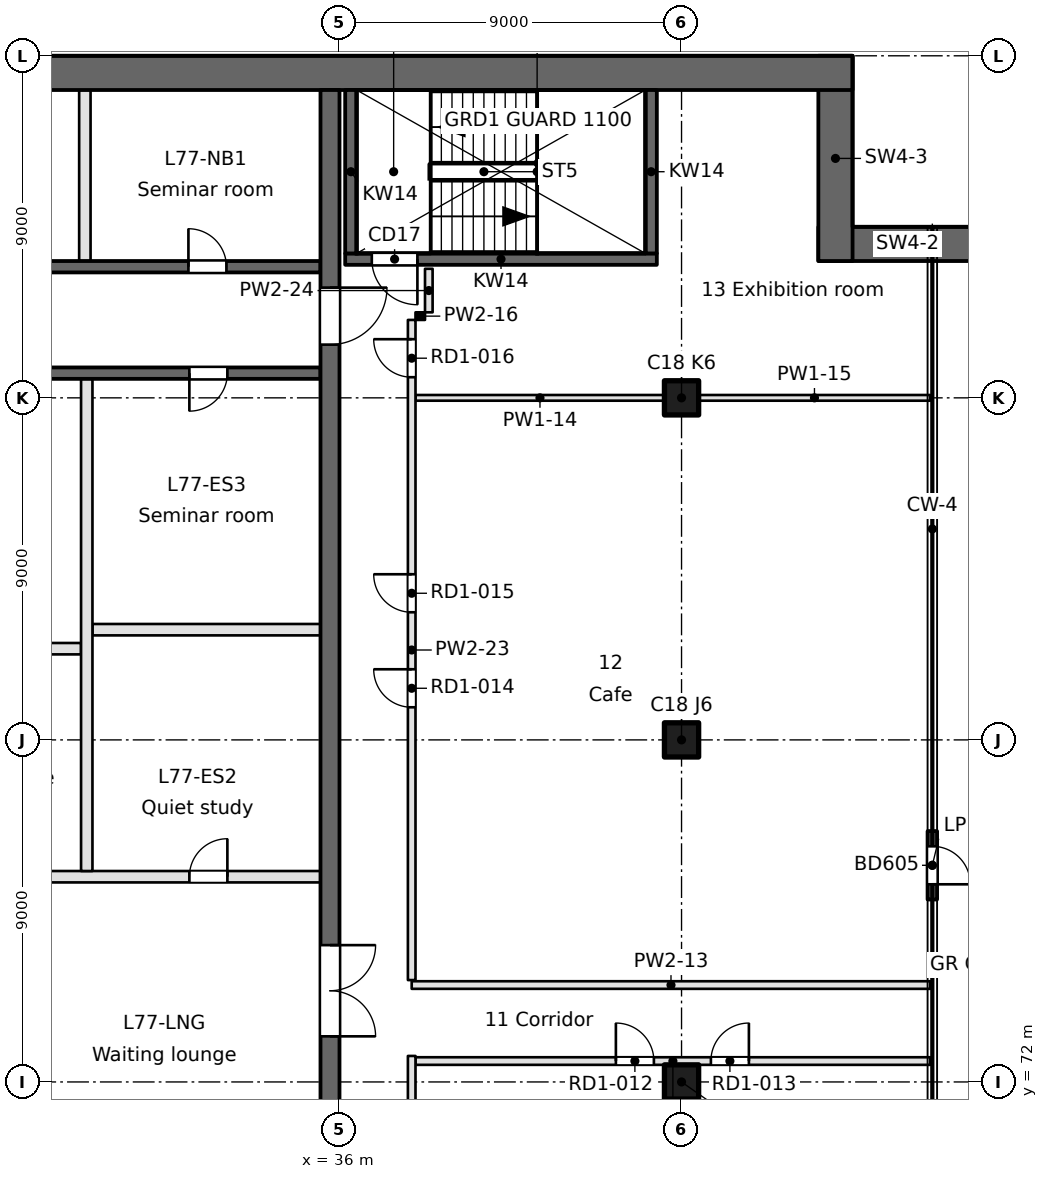
"""IFC4 building model, lengths in metres.
Left out: names, types, materials, properties, quantities, classifications, styles, units other than length and angle.
Written with IfcOpenShell. Run it as: python <this file> out.ifc"""

import sys

from ifc_helpers import new_model, si_unit, direction, frame, frame_2d, origin, origin_2d, place, context, subcontext, project, spatial, rectangle, extrude, element, fill, save


model = new_model("IFC4")
c1 = context("Model", 3, precision=1e-05, world=origin(), true_north=direction((0.0, 1.0)))
c2 = subcontext(c1, "Body", "Model", "MODEL_VIEW")
j1 = project(units=[si_unit("LENGTHUNIT", "METRE"), si_unit("PLANEANGLEUNIT", "RADIAN")], contexts=[c1])
p1 = place(None, origin())
s1 = spatial("IfcSite", under=j1, at=p1, CompositionType="ELEMENT")
p2 = place(p1, origin())
s2 = spatial("IfcBuilding", under=s1, at=p2, CompositionType="ELEMENT")
p3 = place(p2, frame((0.0, 0.0, 299.3)))
s3 = spatial("IfcBuildingStorey", under=s2, at=p3, CompositionType="ELEMENT", Elevation=299.3)
for number, where, z_axis, x_axis in (
    (1, (45.0, 72.0, 0.0), (0.0, 0.0, 1.0), (1.0, 0.0, 0.0)),
    (2, (45.0, 81.0, 0.0), (0.0, 0.0, 1.0), (1.0, 0.0, 0.0)),
    (3, (45.0, 90.0, 0.0), (0.0, 0.0, 1.0), (1.0, 0.0, 0.0)),
):
    element("IfcColumn", number, at=place(p3, frame(where, z_axis=z_axis, x_axis=x_axis)), inside=s3, PredefinedType="COLUMN", context=c2, shape_type="SweptSolid", body=[
        extrude(rectangle(XDim=0.9, YDim=0.9, at=origin_2d()), origin(), (0.0, 0.0, 1.0), 3.7),
    ])
p4 = place(p3, frame((53.3, 94.05, 0.0), z_axis=(0.0, 0.0, 1.0), x_axis=(-1.0, 0.0, 0.0)))
e4 = element("IfcWall", 4, at=p4, inside=s3, PredefinedType="SHEAR", context=c2, shape_type="SweptSolid", body=[
    extrude(rectangle(XDim=4.7, YDim=0.9, at=frame_2d((2.35, 0.0))), origin(), (0.0, 0.0, 1.0), 3.7),
])
p5 = place(p3, frame((49.05, 93.6, 0.0), z_axis=(0.0, 0.0, 1.0), x_axis=(0.0, 1.0, 0.0)))
e5 = element("IfcWall", 5, at=p5, inside=s3, PredefinedType="SHEAR", context=c2, shape_type="SweptSolid", body=[
    extrude(rectangle(XDim=5.4, YDim=0.9, at=frame_2d((2.7, 0.0))), origin(), (0.0, 0.0, 1.0), 3.7),
])
p6 = place(p3, frame((49.5, 98.55, 0.0), z_axis=(0.0, 0.0, 1.0), x_axis=(-1.0, 0.0, 0.0)))
e6 = element("IfcWall", 6, at=p6, inside=s3, PredefinedType="SHEAR", context=c2, shape_type="SweptSolid", body=[
    extrude(rectangle(XDim=45.0, YDim=0.9, at=frame_2d((22.5, 0.0))), origin(), (0.0, 0.0, 1.0), 3.7),
])
p7 = place(p3, frame((51.599, 76.801, 0.0), z_axis=(0.0, 0.0, 1.0), x_axis=(0.0, 1.0, 0.0)))
e7 = element("IfcWall", 7, at=p7, inside=s3, PredefinedType="SOLIDWALL", context=c2, shape_type="SweptSolid", body=[
    extrude(rectangle(XDim=1.8, YDim=0.25, at=frame_2d((0.9, 0.0))), origin(), (0.0, 0.0, 1.0), 3.25),
])
p8 = place(p7, frame((0.4, 0.0, 0.0)))
e8 = element("IfcOpeningElement", 8, at=p8, cuts=e7, PredefinedType="OPENING", context=c2, shape_type="SweptSolid", body=[
    extrude(rectangle(XDim=1.0, YDim=2.1, at=frame_2d((0.5, 1.05))), frame((0.0, 0.125, 0.0), z_axis=(0.0, -1.0, 0.0), x_axis=(1.0, 0.0, 0.0)), (0.0, 0.0, 1.0), 0.25),
])
p9 = place(p3, frame((22.35, 77.4, 0.0), z_axis=(0.0, 0.0, 1.0), x_axis=(1.0, 0.0, 0.0)))
e9 = element("IfcWall", 9, at=p9, inside=s3, PredefinedType="PARTITIONING", context=c2, shape_type="SweptSolid", body=[
    extrude(rectangle(XDim=13.15, YDim=0.3, at=frame_2d((6.575, 0.0))), origin(), (0.0, 0.0, 1.0), 3.25),
])
p10 = place(p9, frame((3.0, 0.0, 0.0)))
e10 = element("IfcOpeningElement", 10, at=p10, cuts=e9, PredefinedType="OPENING", context=c2, shape_type="SweptSolid", body=[
    extrude(rectangle(XDim=1.0, YDim=2.1, at=frame_2d((0.5, 1.05))), frame((0.0, 0.15, 0.0), z_axis=(0.0, -1.0, 0.0), x_axis=(1.0, 0.0, 0.0)), (0.0, 0.0, 1.0), 0.3),
])
p11 = place(p9, frame((9.7, 0.0, 0.0)))
e11 = element("IfcOpeningElement", 11, at=p11, cuts=e9, PredefinedType="OPENING", context=c2, shape_type="SweptSolid", body=[
    extrude(rectangle(XDim=1.0, YDim=2.1, at=frame_2d((0.5, 1.05))), frame((0.0, 0.15, 0.0), z_axis=(0.0, -1.0, 0.0), x_axis=(1.0, 0.0, 0.0)), (0.0, 0.0, 1.0), 0.3),
])
p12 = place(p3, frame((22.5, 83.4, 0.0), z_axis=(0.0, 0.0, 1.0), x_axis=(1.0, 0.0, 0.0)))
e12 = element("IfcWall", 12, at=p12, inside=s3, PredefinedType="PARTITIONING", context=c2, shape_type="SweptSolid", body=[
    extrude(rectangle(XDim=6.7, YDim=0.3, at=frame_2d((3.35, 0.0))), origin(), (0.0, 0.0, 1.0), 3.25),
])
p13 = place(p3, frame((29.5, 83.9, 0.0), z_axis=(0.0, 0.0, 1.0), x_axis=(1.0, 0.0, 0.0)))
e13 = element("IfcWall", 13, at=p13, inside=s3, PredefinedType="PARTITIONING", context=c2, shape_type="SweptSolid", body=[
    extrude(rectangle(XDim=6.0, YDim=0.3, at=frame_2d((3.0, 0.0))), origin(), (0.0, 0.0, 1.0), 3.25),
])
p14 = place(p3, frame((0.9, 90.65, -0.4), z_axis=(0.0, 0.0, 1.0), x_axis=(1.0, 0.0, 0.0)))
e14 = element("IfcWall", 14, at=p14, inside=s3, PredefinedType="SOLIDWALL", context=c2, shape_type="SweptSolid", body=[
    extrude(rectangle(XDim=34.6, YDim=0.3, at=frame_2d((17.3, 0.0))), origin(), (0.0, 0.0, 1.0), 3.65),
])
p15 = place(p14, frame((15.55, 0.0, 0.4)))
e15 = element("IfcOpeningElement", 15, at=p15, cuts=e14, PredefinedType="OPENING", context=c2, shape_type="SweptSolid", body=[
    extrude(rectangle(XDim=1.0, YDim=2.1, at=frame_2d((0.5, 1.05))), frame((0.0, 0.15, 0.0), z_axis=(0.0, -1.0, 0.0), x_axis=(1.0, 0.0, 0.0)), (0.0, 0.0, 1.0), 0.3),
])
p16 = place(p14, frame((2.35, 0.0, 0.4)))
e16 = element("IfcOpeningElement", 16, at=p16, cuts=e14, PredefinedType="OPENING", context=c2, shape_type="SweptSolid", body=[
    extrude(rectangle(XDim=1.0, YDim=2.1, at=frame_2d((0.5, 1.05))), frame((0.0, 0.15, 0.0), z_axis=(0.0, -1.0, 0.0), x_axis=(1.0, 0.0, 0.0)), (0.0, 0.0, 1.0), 0.3),
])
p17 = place(p14, frame((7.75, 0.0, 0.4)))
e17 = element("IfcOpeningElement", 17, at=p17, cuts=e14, PredefinedType="OPENING", context=c2, shape_type="SweptSolid", body=[
    extrude(rectangle(XDim=1.0, YDim=2.1, at=frame_2d((0.5, 1.05))), frame((0.0, 0.15, 0.0), z_axis=(0.0, -1.0, 0.0), x_axis=(1.0, 0.0, 0.0)), (0.0, 0.0, 1.0), 0.3),
])
p18 = place(p14, frame((24.45, 0.0, 0.4)))
e18 = element("IfcOpeningElement", 18, at=p18, cuts=e14, PredefinedType="OPENING", context=c2, shape_type="SweptSolid", body=[
    extrude(rectangle(XDim=1.0, YDim=2.1, at=frame_2d((0.5, 1.05))), frame((0.0, 0.15, 0.0), z_axis=(0.0, -1.0, 0.0), x_axis=(1.0, 0.0, 0.0)), (0.0, 0.0, 1.0), 0.3),
])
p19 = place(p14, frame((31.15, 0.0, 0.4)))
e19 = element("IfcOpeningElement", 19, at=p19, cuts=e14, PredefinedType="OPENING", context=c2, shape_type="SweptSolid", body=[
    extrude(rectangle(XDim=1.0, YDim=2.1, at=frame_2d((0.5, 1.05))), frame((0.0, 0.15, 0.0), z_axis=(0.0, -1.0, 0.0), x_axis=(1.0, 0.0, 0.0)), (0.0, 0.0, 1.0), 0.3),
])
p20 = place(p3, frame((0.9, 93.45, -0.4), z_axis=(0.0, 0.0, 1.0), x_axis=(1.0, 0.0, 0.0)))
e20 = element("IfcWall", 20, at=p20, inside=s3, PredefinedType="SOLIDWALL", context=c2, shape_type="SweptSolid", body=[
    extrude(rectangle(XDim=34.6, YDim=0.3, at=frame_2d((17.3, 0.0))), origin(), (0.0, 0.0, 1.0), 3.65),
])
p21 = place(p20, frame((9.7, 0.0, 0.4)))
e21 = element("IfcOpeningElement", 21, at=p21, cuts=e20, PredefinedType="OPENING", context=c2, shape_type="SweptSolid", body=[
    extrude(rectangle(XDim=1.2, YDim=2.1, at=frame_2d((0.6, 1.05))), frame((0.0, 0.15, 0.0), z_axis=(0.0, -1.0, 0.0), x_axis=(1.0, 0.0, 0.0)), (0.0, 0.0, 1.0), 0.3),
])
p22 = place(p20, frame((24.3, 0.0, 0.4)))
e22 = element("IfcOpeningElement", 22, at=p22, cuts=e20, PredefinedType="OPENING", context=c2, shape_type="SweptSolid", body=[
    extrude(rectangle(XDim=1.0, YDim=2.1, at=frame_2d((0.5, 1.05))), frame((0.0, 0.15, 0.0), z_axis=(0.0, -1.0, 0.0), x_axis=(1.0, 0.0, 0.0)), (0.0, 0.0, 1.0), 0.3),
])
p23 = place(p20, frame((31.125, 0.0, 0.4)))
e23 = element("IfcOpeningElement", 23, at=p23, cuts=e20, PredefinedType="OPENING", context=c2, shape_type="SweptSolid", body=[
    extrude(rectangle(XDim=1.0, YDim=2.1, at=frame_2d((0.5, 1.05))), frame((0.0, 0.15, 0.0), z_axis=(0.0, -1.0, 0.0), x_axis=(1.0, 0.0, 0.0)), (0.0, 0.0, 1.0), 0.3),
])
p24 = place(p3, frame((36.15, 93.65, -0.4), z_axis=(0.0, 0.0, 1.0), x_axis=(1.0, 0.0, 0.0)))
e24 = element("IfcWall", 24, at=p24, inside=s3, PredefinedType="SOLIDWALL", context=c2, shape_type="SweptSolid", body=[
    extrude(rectangle(XDim=8.2, YDim=0.3, at=frame_2d((4.1, 0.0))), origin(), (0.0, 0.0, 1.0), 3.65),
])
p25 = place(p24, frame((0.7, 0.0, 0.4)))
e25 = element("IfcOpeningElement", 25, at=p25, cuts=e24, PredefinedType="OPENING", context=c2, shape_type="SweptSolid", body=[
    extrude(rectangle(XDim=1.2, YDim=2.1, at=frame_2d((0.6, 1.05))), frame((0.0, 0.15, 0.0), z_axis=(0.0, -1.0, 0.0), x_axis=(1.0, 0.0, 0.0)), (0.0, 0.0, 1.0), 0.3),
])
p26 = place(p3, frame((29.3, 93.6, 0.0), z_axis=(0.0, 0.0, 1.0), x_axis=(0.0, 1.0, 0.0)))
e26 = element("IfcWall", 26, at=p26, inside=s3, PredefinedType="PARTITIONING", context=c2, shape_type="SweptSolid", body=[
    extrude(rectangle(XDim=4.5, YDim=0.3, at=frame_2d((2.25, 0.0))), origin(), (0.0, 0.0, 1.0), 3.25),
])
p27 = place(p3, frame((29.35, 77.55, 0.0), z_axis=(0.0, 0.0, 1.0), x_axis=(0.0, 1.0, 0.0)))
e27 = element("IfcWall", 27, at=p27, inside=s3, PredefinedType="PARTITIONING", context=c2, shape_type="SweptSolid", body=[
    extrude(rectangle(XDim=12.95, YDim=0.3, at=frame_2d((6.475, 0.0))), origin(), (0.0, 0.0, 1.0), 3.25),
])
p28 = place(p3, frame((35.75, 63.5, -0.4), z_axis=(0.0, 0.0, 1.0), x_axis=(0.0, 1.0, 0.0)))
e28 = element("IfcWall", 28, at=p28, inside=s3, PredefinedType="SOLIDWALL", context=c2, shape_type="SweptSolid", body=[
    extrude(rectangle(XDim=34.6, YDim=0.5, at=frame_2d((17.3, 0.0))), origin(), (0.0, 0.0, 1.0), 3.65),
])
p29 = place(p28, frame((9.7, 0.0, 0.4)))
e29 = element("IfcOpeningElement", 29, at=p29, cuts=e28, PredefinedType="OPENING", context=c2, shape_type="SweptSolid", body=[
    extrude(rectangle(XDim=2.4, YDim=2.1, at=frame_2d((1.2, 1.05))), frame((0.0, 0.25, 0.0), z_axis=(0.0, -1.0, 0.0), x_axis=(1.0, 0.0, 0.0)), (0.0, 0.0, 1.0), 0.5),
])
p30 = place(p28, frame((27.9, 0.0, 0.4)))
e30 = element("IfcOpeningElement", 30, at=p30, cuts=e28, PredefinedType="OPENING", context=c2, shape_type="SweptSolid", body=[
    extrude(rectangle(XDim=1.5, YDim=2.1, at=frame_2d((0.75, 1.05))), frame((0.0, 0.25, 0.0), z_axis=(0.0, -1.0, 0.0), x_axis=(1.0, 0.0, 0.0)), (0.0, 0.0, 1.0), 0.5),
])
p31 = place(p28, frame((1.5, 0.0, 0.4)))
e31 = element("IfcOpeningElement", 31, at=p31, cuts=e28, PredefinedType="OPENING", context=c2, shape_type="SweptSolid", body=[
    extrude(rectangle(XDim=1.2, YDim=2.1, at=frame_2d((0.6, 1.05))), frame((0.0, 0.25, 0.0), z_axis=(0.0, -1.0, 0.0), x_axis=(1.0, 0.0, 0.0)), (0.0, 0.0, 1.0), 0.5),
])
for number, where, z_axis, x_axis in (
    (32, (36.3, 93.8, -0.4), (0.0, 0.0, 1.0), (0.0, 1.0, 0.0)),
    (33, (44.2, 93.8, -0.4), (0.0, 0.0, 1.0), (0.0, 1.0, 0.0)),
):
    element("IfcWall", number, at=place(p3, frame(where, z_axis=z_axis, x_axis=x_axis)), inside=s3, PredefinedType="SOLIDWALL", context=c2, shape_type="SweptSolid", body=[
        extrude(rectangle(XDim=4.3, YDim=0.3, at=frame_2d((2.15, 0.0))), origin(), (0.0, 0.0, 1.0), 3.65),
    ])
p32 = place(p3, frame((51.545, 72.55, 0.0), z_axis=(0.0, 0.0, 1.0), x_axis=(-1.0, 0.0, 0.0)))
e34 = element("IfcWall", 34, at=p32, inside=s3, PredefinedType="PARTITIONING", context=c2, shape_type="SweptSolid", body=[
    extrude(rectangle(XDim=13.545, YDim=0.2, at=frame_2d((6.772, 0.0))), origin(), (0.0, 0.0, 1.0), 3.25),
])
p33 = place(p32, frame((7.272, 0.0, 0.0)))
e35 = element("IfcOpeningElement", 35, at=p33, cuts=e34, PredefinedType="OPENING", context=c2, shape_type="SweptSolid", body=[
    extrude(rectangle(XDim=1.0, YDim=2.1, at=frame_2d((0.5, 1.05))), frame((0.0, 0.1, 0.0), z_axis=(0.0, -1.0, 0.0), x_axis=(1.0, 0.0, 0.0)), (0.0, 0.0, 1.0), 0.2),
])
p34 = place(p32, frame((4.772, 0.0, 0.0)))
e36 = element("IfcOpeningElement", 36, at=p34, cuts=e34, PredefinedType="OPENING", context=c2, shape_type="SweptSolid", body=[
    extrude(rectangle(XDim=1.0, YDim=2.1, at=frame_2d((0.5, 1.05))), frame((0.0, 0.1, 0.0), z_axis=(0.0, -1.0, 0.0), x_axis=(1.0, 0.0, 0.0)), (0.0, 0.0, 1.0), 0.2),
])
p35 = place(p3, frame((37.9, 74.55, 0.0), z_axis=(0.0, 0.0, 1.0), x_axis=(1.0, 0.0, 0.0)))
e37 = element("IfcWall", 37, at=p35, inside=s3, PredefinedType="PARTITIONING", context=c2, shape_type="SweptSolid", body=[
    extrude(rectangle(XDim=13.645, YDim=0.2, at=frame_2d((6.823, 0.0))), origin(), (0.0, 0.0, 1.0), 3.25),
])
p36 = place(p3, frame((38.0, 90.0, 0.0), z_axis=(0.0, 0.0, 1.0), x_axis=(1.0, 0.0, 0.0)))
e38 = element("IfcWall", 38, at=p36, inside=s3, PredefinedType="PARTITIONING", context=c2, shape_type="SweptSolid", body=[
    extrude(rectangle(XDim=6.55, YDim=0.15, at=frame_2d((3.275, 0.0))), origin(), (0.0, 0.0, 1.0), 3.25),
])
p37 = place(p3, frame((45.45, 90.0, 0.0), z_axis=(0.0, 0.0, 1.0), x_axis=(1.0, 0.0, 0.0)))
e39 = element("IfcWall", 39, at=p37, inside=s3, PredefinedType="PARTITIONING", context=c2, shape_type="SweptSolid", body=[
    extrude(rectangle(XDim=6.095, YDim=0.15, at=frame_2d((3.047, 0.0))), origin(), (0.0, 0.0, 1.0), 3.25),
])
p38 = place(p3, frame((38.25, 92.15, 0.0), z_axis=(0.0, 0.0, 1.0), x_axis=(-1.0, 0.0, 0.0)))
e40 = element("IfcWall", 40, at=p38, inside=s3, PredefinedType="PARTITIONING", context=c2, shape_type="SweptSolid", body=[
    extrude(rectangle(XDim=0.25, YDim=0.2, at=frame_2d((0.125, 0.0))), origin(), (0.0, 0.0, 1.0), 3.25),
])
p39 = place(p3, frame((37.9, 72.684, 0.0), z_axis=(0.0, 0.0, 1.0), x_axis=(0.0, -1.0, 0.0)))
e41 = element("IfcWall", 41, at=p39, inside=s3, PredefinedType="PARTITIONING", context=c2, shape_type="SweptSolid", body=[
    extrude(rectangle(XDim=8.884, YDim=0.2, at=frame_2d((4.442, 0.0))), origin(), (0.0, 0.0, 1.0), 3.25),
])
p40 = place(p3, frame((37.9, 92.05, 0.0), z_axis=(0.0, 0.0, 1.0), x_axis=(0.0, -1.0, 0.0)))
e42 = element("IfcWall", 42, at=p40, inside=s3, PredefinedType="PARTITIONING", context=c2, shape_type="SweptSolid", body=[
    extrude(rectangle(XDim=17.369, YDim=0.2, at=frame_2d((8.685, 0.0))), origin(), (0.0, 0.0, 1.0), 3.25),
])
p41 = place(p40, frame((9.192, 0.0, 0.0)))
e43 = element("IfcOpeningElement", 43, at=p41, cuts=e42, PredefinedType="OPENING", context=c2, shape_type="SweptSolid", body=[
    extrude(rectangle(XDim=1.0, YDim=2.1, at=frame_2d((0.5, 1.05))), frame((0.0, 0.1, 0.0), z_axis=(0.0, -1.0, 0.0), x_axis=(1.0, 0.0, 0.0)), (0.0, 0.0, 1.0), 0.2),
])
p42 = place(p40, frame((6.692, 0.0, 0.0)))
e44 = element("IfcOpeningElement", 44, at=p42, cuts=e42, PredefinedType="OPENING", context=c2, shape_type="SweptSolid", body=[
    extrude(rectangle(XDim=1.0, YDim=2.1, at=frame_2d((0.5, 1.05))), frame((0.0, 0.1, 0.0), z_axis=(0.0, -1.0, 0.0), x_axis=(1.0, 0.0, 0.0)), (0.0, 0.0, 1.0), 0.2),
])
p43 = place(p40, frame((0.507, 0.0, 0.0)))
e45 = element("IfcOpeningElement", 45, at=p43, cuts=e42, PredefinedType="OPENING", context=c2, shape_type="SweptSolid", body=[
    extrude(rectangle(XDim=1.0, YDim=2.1, at=frame_2d((0.5, 1.05))), frame((0.0, 0.1, 0.0), z_axis=(0.0, -1.0, 0.0), x_axis=(1.0, 0.0, 0.0)), (0.0, 0.0, 1.0), 0.2),
])
p44 = place(p3, frame((38.35, 93.396, 0.0), z_axis=(0.0, 0.0, 1.0), x_axis=(0.0, -1.0, 0.0)))
e46 = element("IfcWall", 46, at=p44, inside=s3, PredefinedType="PARTITIONING", context=c2, shape_type="SweptSolid", body=[
    extrude(rectangle(XDim=1.146, YDim=0.2, at=frame_2d((0.573, 0.0))), origin(), (0.0, 0.0, 1.0), 3.25),
])
p45 = place(p8, frame((1.0, 0.0, 0.0), z_axis=(0.0, 0.0, 1.0), x_axis=(-1.0, 0.0, 0.0)))
e47 = element("IfcDoor", 47, at=p45, inside=s3, OperationType="SINGLE_SWING_RIGHT", PredefinedType="DOOR", context=c2, shape_type="SweptSolid", body=[
    extrude(rectangle(XDim=1.0, YDim=2.1, at=frame_2d((0.5, 1.05))), frame((0.0, 0.025, 0.0), z_axis=(0.0, -1.0, 0.0), x_axis=(1.0, 0.0, 0.0)), (0.0, 0.0, 1.0), 0.05),
])
fill(e8, e47)
p46 = place(p29, frame((2.4, 0.0, 0.0), z_axis=(0.0, 0.0, 1.0), x_axis=(-1.0, 0.0, 0.0)))
e48 = element("IfcDoor", 48, at=p46, inside=s3, OperationType="DOUBLE_DOOR_SINGLE_SWING", PredefinedType="DOOR", context=c2, shape_type="SweptSolid", body=[
    extrude(rectangle(XDim=2.4, YDim=2.1, at=frame_2d((1.2, 1.05))), frame((0.0, 0.025, 0.0), z_axis=(0.0, -1.0, 0.0), x_axis=(1.0, 0.0, 0.0)), (0.0, 0.0, 1.0), 0.05),
])
fill(e29, e48)
p47 = place(p30, frame((1.5, 0.0, 0.0), z_axis=(0.0, 0.0, 1.0), x_axis=(-1.0, 0.0, 0.0)))
e49 = element("IfcDoor", 49, at=p47, inside=s3, OperationType="SINGLE_SWING_LEFT", PredefinedType="DOOR", context=c2, shape_type="SweptSolid", body=[
    extrude(rectangle(XDim=1.5, YDim=2.1, at=frame_2d((0.75, 1.05))), frame((0.0, 0.025, 0.0), z_axis=(0.0, -1.0, 0.0), x_axis=(1.0, 0.0, 0.0)), (0.0, 0.0, 1.0), 0.05),
])
fill(e30, e49)
p48 = place(p25, frame((1.2, 0.0, 0.0), z_axis=(0.0, 0.0, 1.0), x_axis=(-1.0, 0.0, 0.0)))
e50 = element("IfcDoor", 50, at=p48, inside=s3, OperationType="SINGLE_SWING_LEFT", PredefinedType="DOOR", context=c2, shape_type="SweptSolid", body=[
    extrude(rectangle(XDim=1.2, YDim=2.1, at=frame_2d((0.6, 1.05))), frame((0.0, 0.025, 0.0), z_axis=(0.0, -1.0, 0.0), x_axis=(1.0, 0.0, 0.0)), (0.0, 0.0, 1.0), 0.05),
])
fill(e25, e50)
p49 = place(p11, origin())
e51 = element("IfcDoor", 51, at=p49, inside=s3, OperationType="SINGLE_SWING_RIGHT", PredefinedType="DOOR", context=c2, shape_type="SweptSolid", body=[
    extrude(rectangle(XDim=1.0, YDim=2.1, at=frame_2d((0.5, 1.05))), frame((0.0, 0.025, 0.0), z_axis=(0.0, -1.0, 0.0), x_axis=(1.0, 0.0, 0.0)), (0.0, 0.0, 1.0), 0.05),
])
fill(e11, e51)
p50 = place(p19, frame((1.0, 0.0, 0.0), z_axis=(0.0, 0.0, 1.0), x_axis=(-1.0, 0.0, 0.0)))
e52 = element("IfcDoor", 52, at=p50, inside=s3, OperationType="SINGLE_SWING_RIGHT", PredefinedType="DOOR", context=c2, shape_type="SweptSolid", body=[
    extrude(rectangle(XDim=1.0, YDim=2.1, at=frame_2d((0.5, 1.05))), frame((0.0, 0.025, 0.0), z_axis=(0.0, -1.0, 0.0), x_axis=(1.0, 0.0, 0.0)), (0.0, 0.0, 1.0), 0.05),
])
fill(e19, e52)
p51 = place(p23, origin())
e53 = element("IfcDoor", 53, at=p51, inside=s3, OperationType="SINGLE_SWING_LEFT", PredefinedType="DOOR", context=c2, shape_type="SweptSolid", body=[
    extrude(rectangle(XDim=1.0, YDim=2.1, at=frame_2d((0.5, 1.05))), frame((0.0, 0.025, 0.0), z_axis=(0.0, -1.0, 0.0), x_axis=(1.0, 0.0, 0.0)), (0.0, 0.0, 1.0), 0.05),
])
fill(e23, e53)
p52 = place(p33, frame((1.0, 0.0, 0.0), z_axis=(0.0, 0.0, 1.0), x_axis=(-1.0, 0.0, 0.0)))
e54 = element("IfcDoor", 54, at=p52, inside=s3, OperationType="SINGLE_SWING_LEFT", PredefinedType="DOOR", context=c2, shape_type="SweptSolid", body=[
    extrude(rectangle(XDim=1.0, YDim=2.1, at=frame_2d((0.5, 1.05))), frame((0.0, 0.025, 0.0), z_axis=(0.0, -1.0, 0.0), x_axis=(1.0, 0.0, 0.0)), (0.0, 0.0, 1.0), 0.05),
])
fill(e35, e54)
p53 = place(p34, frame((1.0, 0.0, 0.0), z_axis=(0.0, 0.0, 1.0), x_axis=(-1.0, 0.0, 0.0)))
e55 = element("IfcDoor", 55, at=p53, inside=s3, OperationType="SINGLE_SWING_RIGHT", PredefinedType="DOOR", context=c2, shape_type="SweptSolid", body=[
    extrude(rectangle(XDim=1.0, YDim=2.1, at=frame_2d((0.5, 1.05))), frame((0.0, 0.025, 0.0), z_axis=(0.0, -1.0, 0.0), x_axis=(1.0, 0.0, 0.0)), (0.0, 0.0, 1.0), 0.05),
])
fill(e36, e55)
p54 = place(p41, frame((1.0, 0.0, 0.0), z_axis=(0.0, 0.0, 1.0), x_axis=(-1.0, 0.0, 0.0)))
e56 = element("IfcDoor", 56, at=p54, inside=s3, OperationType="SINGLE_SWING_RIGHT", PredefinedType="DOOR", context=c2, shape_type="SweptSolid", body=[
    extrude(rectangle(XDim=1.0, YDim=2.1, at=frame_2d((0.5, 1.05))), frame((0.0, 0.025, 0.0), z_axis=(0.0, -1.0, 0.0), x_axis=(1.0, 0.0, 0.0)), (0.0, 0.0, 1.0), 0.05),
])
fill(e43, e56)
p55 = place(p42, frame((1.0, 0.0, 0.0), z_axis=(0.0, 0.0, 1.0), x_axis=(-1.0, 0.0, 0.0)))
e57 = element("IfcDoor", 57, at=p55, inside=s3, OperationType="SINGLE_SWING_RIGHT", PredefinedType="DOOR", context=c2, shape_type="SweptSolid", body=[
    extrude(rectangle(XDim=1.0, YDim=2.1, at=frame_2d((0.5, 1.05))), frame((0.0, 0.025, 0.0), z_axis=(0.0, -1.0, 0.0), x_axis=(1.0, 0.0, 0.0)), (0.0, 0.0, 1.0), 0.05),
])
fill(e44, e57)
p56 = place(p43, frame((1.0, 0.0, 0.0), z_axis=(0.0, 0.0, 1.0), x_axis=(-1.0, 0.0, 0.0)))
e58 = element("IfcDoor", 58, at=p56, inside=s3, OperationType="SINGLE_SWING_RIGHT", PredefinedType="DOOR", context=c2, shape_type="SweptSolid", body=[
    extrude(rectangle(XDim=1.0, YDim=2.1, at=frame_2d((0.5, 1.05))), frame((0.0, 0.025, 0.0), z_axis=(0.0, -1.0, 0.0), x_axis=(1.0, 0.0, 0.0)), (0.0, 0.0, 1.0), 0.05),
])
fill(e45, e58)
save(model, sys.argv[1])
